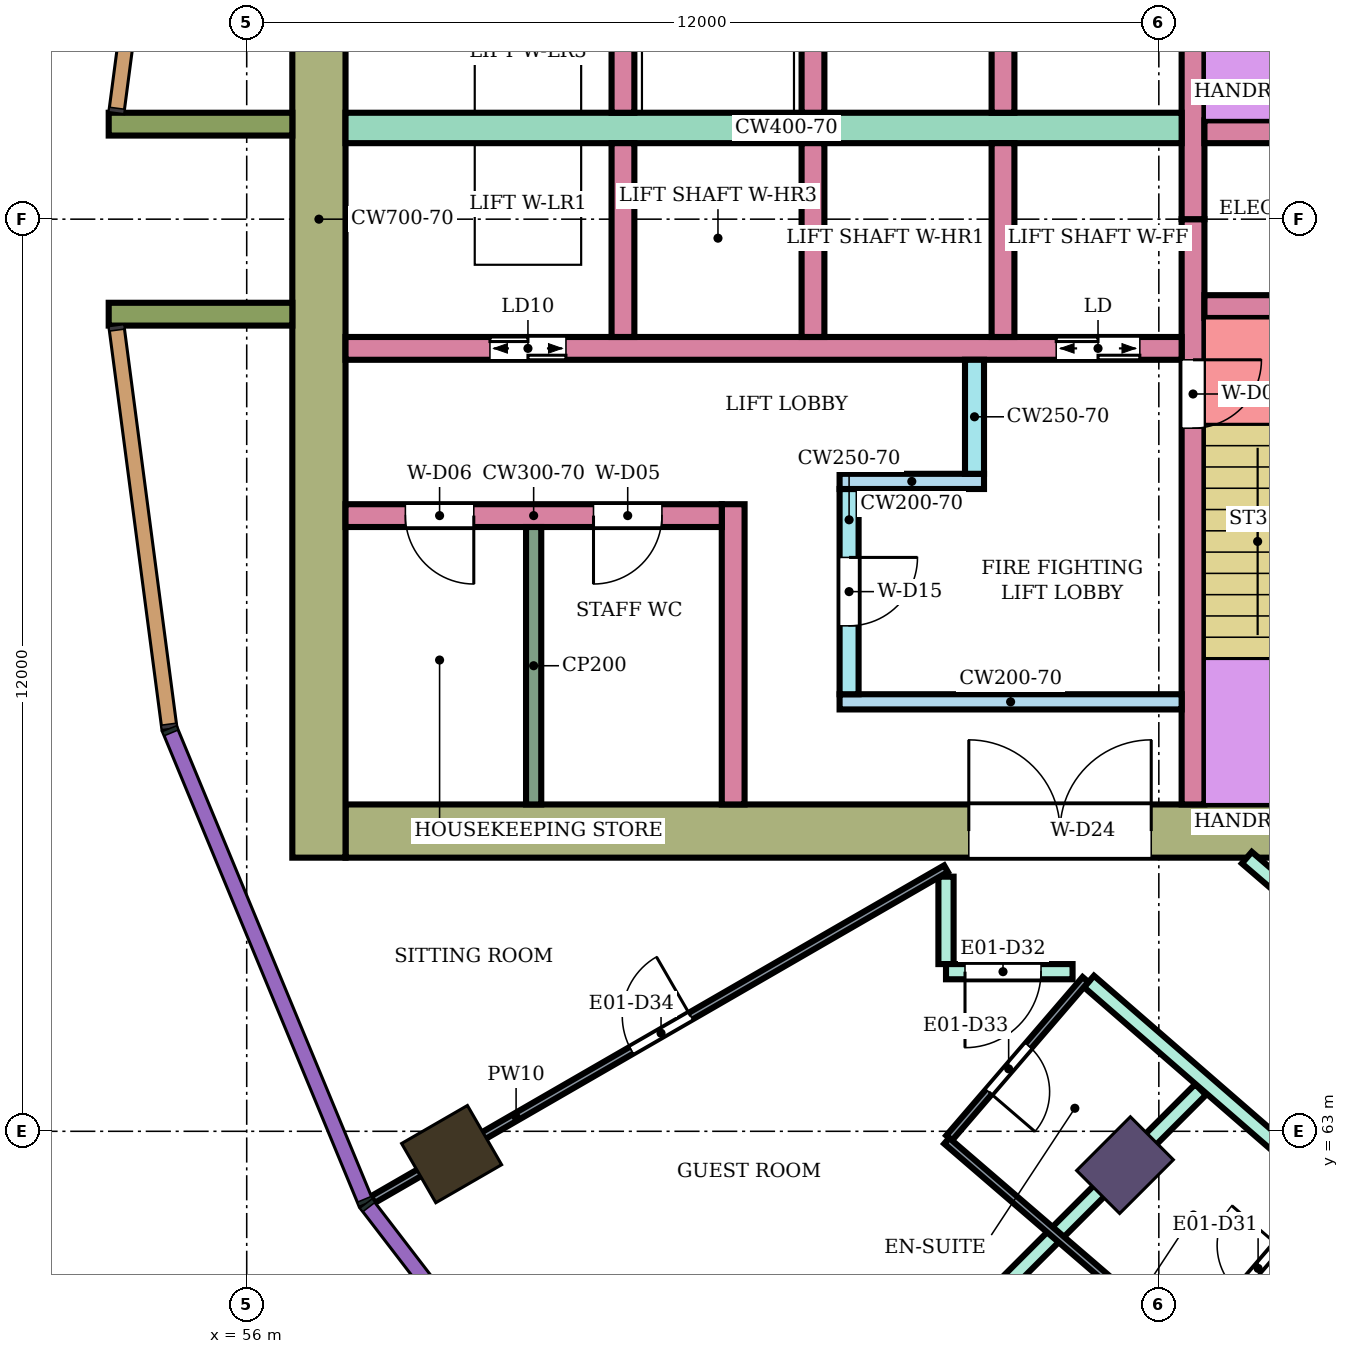
"""IFC4 building model, lengths in metres.
Left out: names, types, materials, properties, quantities, classifications, styles, units other than length and angle.
Written with IfcOpenShell. Run it as: python <this file> out.ifc"""

import sys

from ifc_helpers import new_model, si_unit, direction, frame, frame_2d, origin, origin_2d, place, context, subcontext, project, spatial, rectangle, extrude, element, fill, save


model = new_model("IFC4")
c1 = context("Model", 3, precision=1e-05, world=origin(), true_north=direction((0.0, 1.0)))
c2 = subcontext(c1, "Body", "Model", "MODEL_VIEW")
j1 = project(units=[si_unit("LENGTHUNIT", "METRE"), si_unit("PLANEANGLEUNIT", "RADIAN")], contexts=[c1])
p1 = place(None, origin())
s1 = spatial("IfcSite", under=j1, at=p1, CompositionType="ELEMENT")
p2 = place(p1, origin())
s2 = spatial("IfcBuilding", under=s1, at=p2, CompositionType="ELEMENT")
p3 = place(p2, frame((0.0, 0.0, 118.5)))
s3 = spatial("IfcBuildingStorey", under=s2, at=p3, CompositionType="ELEMENT", Elevation=118.5)
p4 = place(p3, frame((58.696, 62.7, 0.0), z_axis=(0.0, 0.0, 1.0), x_axis=(-0.866025403784, -0.5, 0.0)))
e1 = element("IfcColumn", 1, at=p4, inside=s3, PredefinedType="COLUMN", context=c2, shape_type="SweptSolid", body=[
    extrude(rectangle(XDim=1.0, YDim=0.9, at=origin_2d()), origin(), (0.0, 0.0, 1.0), 3.9),
])
p5 = place(p3, frame((67.555, 62.555, 0.0), z_axis=(0.0, 0.0, 1.0), x_axis=(-0.707106781187, -0.707106781187, 0.0)))
e2 = element("IfcColumn", 2, at=p5, inside=s3, PredefinedType="COLUMN", context=c2, shape_type="SweptSolid", body=[
    extrude(rectangle(XDim=1.0, YDim=0.8, at=origin_2d()), origin(), (0.0, 0.0, 1.0), 3.9),
])
p6 = place(p3, frame((72.1, 66.95, 0.0), z_axis=(0.0, 0.0, 1.0), x_axis=(-1.0, 0.0, 0.0)))
e3 = element("IfcWall", 3, at=p6, inside=s3, PredefinedType="SHEAR", context=c2, shape_type="SweptSolid", body=[
    extrude(rectangle(XDim=14.8, YDim=0.7, at=frame_2d((7.4, 0.0))), origin(), (0.0, 0.0, 1.0), 3.58),
])
p7 = place(p6, frame((4.2, 0.0, 0.0)))
e4 = element("IfcOpeningElement", 4, at=p7, cuts=e3, PredefinedType="OPENING", context=c2, shape_type="SweptSolid", body=[
    extrude(rectangle(XDim=2.4, YDim=2.4, at=frame_2d((1.2, 1.2))), frame((0.0, 0.36, 0.0), z_axis=(0.0, -1.0, 0.0), x_axis=(1.0, 0.0, 0.0)), (0.0, 0.0, 1.0), 0.72),
])
p8 = place(p3, frame((56.95, 83.4, 0.0), z_axis=(0.0, 0.0, 1.0), x_axis=(0.0, -1.0, 0.0)))
e5 = element("IfcWall", 5, at=p8, inside=s3, PredefinedType="SHEAR", context=c2, shape_type="SweptSolid", body=[
    extrude(rectangle(XDim=16.8, YDim=0.7, at=frame_2d((8.4, 0.0))), origin(), (0.0, 0.0, 1.0), 3.58),
])
p9 = place(p3, frame((68.45, 75.0, 0.0), z_axis=(0.0, 0.0, 1.0), x_axis=(0.0, -1.0, 0.0)))
e6 = element("IfcWall", 6, at=p9, inside=s3, PredefinedType="SHEAR", context=c2, shape_type="SweptSolid", body=[
    extrude(rectangle(XDim=7.7, YDim=0.3, at=frame_2d((3.85, 0.0))), origin(), (0.0, 0.0, 1.0), 3.58),
])
p10 = place(p9, frame((1.85, 0.0, 0.0)))
e7 = element("IfcOpeningElement", 7, at=p10, cuts=e6, PredefinedType="OPENING", context=c2, shape_type="SweptSolid", body=[
    extrude(rectangle(XDim=0.9, YDim=2.1, at=frame_2d((0.45, 1.05))), frame((0.0, 0.16, 0.0), z_axis=(0.0, -1.0, 0.0), x_axis=(1.0, 0.0, 0.0)), (0.0, 0.0, 1.0), 0.32),
])
p11 = place(p3, frame((68.45, 82.7, 0.0), z_axis=(0.0, 0.0, 1.0), x_axis=(0.0, -1.0, 0.0)))
e8 = element("IfcWall", 8, at=p11, inside=s3, PredefinedType="SHEAR", context=c2, shape_type="SweptSolid", body=[
    extrude(rectangle(XDim=7.7, YDim=0.3, at=frame_2d((3.85, 0.0))), origin(), (0.0, 0.0, 1.0), 3.58),
])
p12 = place(p11, frame((0.35, 0.0, 0.0)))
e9 = element("IfcOpeningElement", 9, at=p12, cuts=e8, PredefinedType="OPENING", context=c2, shape_type="SweptSolid", body=[
    extrude(rectangle(XDim=0.9, YDim=2.1, at=frame_2d((0.45, 1.05))), frame((0.0, 0.16, 0.0), z_axis=(0.0, -1.0, 0.0), x_axis=(1.0, 0.0, 0.0)), (0.0, 0.0, 1.0), 0.32),
])
p13 = place(p3, frame((71.65, 73.85, 0.0), z_axis=(0.0, 0.0, 1.0), x_axis=(-1.0, 0.0, 0.0)))
e10 = element("IfcWall", 10, at=p13, inside=s3, PredefinedType="SHEAR", context=c2, shape_type="SweptSolid", body=[
    extrude(rectangle(XDim=3.05, YDim=0.3, at=frame_2d((1.525, 0.0))), origin(), (0.0, 0.0, 1.0), 3.58),
])
p14 = place(p13, frame((1.1, 0.0, 0.0)))
e11 = element("IfcOpeningElement", 11, at=p14, cuts=e10, PredefinedType="OPENING", context=c2, shape_type="SweptSolid", body=[
    extrude(rectangle(XDim=0.7, YDim=2.0, at=frame_2d((0.35, 1.0))), frame((0.0, 0.16, 0.0), z_axis=(0.0, -1.0, 0.0), x_axis=(1.0, 0.0, 0.0)), (0.0, 0.0, 1.0), 0.32),
])
p15 = place(p3, frame((71.65, 76.15, 0.0), z_axis=(0.0, 0.0, 1.0), x_axis=(-1.0, 0.0, 0.0)))
e12 = element("IfcWall", 12, at=p15, inside=s3, PredefinedType="SHEAR", context=c2, shape_type="SweptSolid", body=[
    extrude(rectangle(XDim=3.05, YDim=0.3, at=frame_2d((1.525, 0.0))), origin(), (0.0, 0.0, 1.0), 3.58),
])
p16 = place(p3, frame((68.3, 73.3, 0.0), z_axis=(0.0, 0.0, 1.0), x_axis=(-1.0, 0.0, 0.0)))
e13 = element("IfcWall", 13, at=p16, inside=s3, PredefinedType="SHEAR", context=c2, shape_type="SweptSolid", body=[
    extrude(rectangle(XDim=11.0, YDim=0.3, at=frame_2d((5.5, 0.0))), origin(), (0.0, 0.0, 1.0), 3.58),
])
p17 = place(p16, frame((0.55, 0.0, 0.0)))
e14 = element("IfcOpeningElement", 14, at=p17, cuts=e13, PredefinedType="OPENING", context=c2, shape_type="SweptSolid", body=[
    extrude(rectangle(XDim=1.1, YDim=2.1, at=frame_2d((0.55, 1.05))), frame((0.0, 0.16, 0.0), z_axis=(0.0, -1.0, 0.0), x_axis=(1.0, 0.0, 0.0)), (0.0, 0.0, 1.0), 0.32),
])
p18 = place(p16, frame((8.1, 0.0, 0.0)))
e15 = element("IfcOpeningElement", 15, at=p18, cuts=e13, PredefinedType="OPENING", context=c2, shape_type="SweptSolid", body=[
    extrude(rectangle(XDim=1.0, YDim=2.1, at=frame_2d((0.5, 1.05))), frame((0.0, 0.16, 0.0), z_axis=(0.0, -1.0, 0.0), x_axis=(1.0, 0.0, 0.0)), (0.0, 0.0, 1.0), 0.32),
])
p19 = place(p3, frame((68.3, 76.2, 0.0), z_axis=(0.0, 0.0, 1.0), x_axis=(-1.0, 0.0, 0.0)))
e16 = element("IfcWall", 16, at=p19, inside=s3, PredefinedType="SHEAR", context=c2, shape_type="SweptSolid", body=[
    extrude(rectangle(XDim=11.0, YDim=0.4, at=frame_2d((5.5, 0.0))), origin(), (0.0, 0.0, 1.0), 3.58),
])
for number, where, z_axis, x_axis in (
    (17, (65.95, 76.0, 0.0), (0.0, 0.0, 1.0), (0.0, -1.0, 0.0)),
    (18, (63.45, 76.0, 0.0), (0.0, 0.0, 1.0), (0.0, -1.0, 0.0)),
    (19, (60.95, 76.0, 0.0), (0.0, 0.0, 1.0), (0.0, -1.0, 0.0)),
    (20, (65.95, 78.95, 0.0), (0.0, 0.0, 1.0), (0.0, -1.0, 0.0)),
    (21, (63.45, 78.95, 0.0), (0.0, 0.0, 1.0), (0.0, -1.0, 0.0)),
    (22, (60.95, 78.95, 0.0), (0.0, 0.0, 1.0), (0.0, -1.0, 0.0)),
):
    element("IfcWall", number, at=place(p3, frame(where, z_axis=z_axis, x_axis=x_axis)), inside=s3, PredefinedType="SHEAR", context=c2, shape_type="SweptSolid", body=[
        extrude(rectangle(XDim=2.55, YDim=0.3, at=frame_2d((1.275, 0.0))), origin(), (0.0, 0.0, 1.0), 3.58),
    ])
p20 = place(p3, frame((68.3, 68.65, 0.0), z_axis=(0.0, 0.0, 1.0), x_axis=(-1.0, 0.0, 0.0)))
e23 = element("IfcWall", 23, at=p20, inside=s3, PredefinedType="SHEAR", context=c2, shape_type="SweptSolid", body=[
    extrude(rectangle(XDim=4.5, YDim=0.2, at=frame_2d((2.25, 0.0))), origin(), (0.0, 0.0, 1.0), 3.58),
])
p21 = place(p3, frame((63.925, 71.45, 0.0), z_axis=(0.0, 0.0, 1.0), x_axis=(0.0, -1.0, 0.0)))
e24 = element("IfcWall", 24, at=p21, inside=s3, PredefinedType="SHEAR", context=c2, shape_type="SweptSolid", body=[
    extrude(rectangle(XDim=2.7, YDim=0.25, at=frame_2d((1.35, 0.0))), origin(), (0.0, 0.0, 1.0), 3.58),
])
p22 = place(p21, frame((0.9, 0.0, 0.0)))
e25 = element("IfcOpeningElement", 25, at=p22, cuts=e24, PredefinedType="OPENING", context=c2, shape_type="SweptSolid", body=[
    extrude(rectangle(XDim=0.9, YDim=2.1, at=frame_2d((0.45, 1.05))), frame((0.0, 0.135, 0.0), z_axis=(0.0, -1.0, 0.0), x_axis=(1.0, 0.0, 0.0)), (0.0, 0.0, 1.0), 0.27),
])
p23 = place(p3, frame((65.7, 71.55, 0.0), z_axis=(0.0, 0.0, 1.0), x_axis=(-1.0, 0.0, 0.0)))
e26 = element("IfcWall", 26, at=p23, inside=s3, PredefinedType="SHEAR", context=c2, shape_type="SweptSolid", body=[
    extrude(rectangle(XDim=1.9, YDim=0.2, at=frame_2d((0.95, 0.0))), origin(), (0.0, 0.0, 1.0), 3.58),
])
p24 = place(p3, frame((65.575, 73.15, 0.0), z_axis=(0.0, 0.0, 1.0), x_axis=(0.0, -1.0, 0.0)))
e27 = element("IfcWall", 27, at=p24, inside=s3, PredefinedType="SHEAR", context=c2, shape_type="SweptSolid", body=[
    extrude(rectangle(XDim=1.5, YDim=0.25, at=frame_2d((0.75, 0.0))), origin(), (0.0, 0.0, 1.0), 3.58),
])
p25 = place(p3, frame((62.4, 71.25, 0.0), z_axis=(0.0, 0.0, 1.0), x_axis=(0.0, -1.0, 0.0)))
e28 = element("IfcWall", 28, at=p25, inside=s3, PredefinedType="SHEAR", context=c2, shape_type="SweptSolid", body=[
    extrude(rectangle(XDim=3.95, YDim=0.3, at=frame_2d((1.975, 0.0))), origin(), (0.0, 0.0, 1.0), 3.58),
])
p26 = place(p3, frame((62.25, 71.1, 0.0), z_axis=(0.0, 0.0, 1.0), x_axis=(-1.0, 0.0, 0.0)))
e29 = element("IfcWall", 29, at=p26, inside=s3, PredefinedType="SHEAR", context=c2, shape_type="SweptSolid", body=[
    extrude(rectangle(XDim=4.95, YDim=0.3, at=frame_2d((2.475, 0.0))), origin(), (0.0, 0.0, 1.0), 3.58),
])
p27 = place(p26, frame((0.788, 0.0, 0.0)))
e30 = element("IfcOpeningElement", 30, at=p27, cuts=e29, PredefinedType="OPENING", context=c2, shape_type="SweptSolid", body=[
    extrude(rectangle(XDim=0.9, YDim=2.1, at=frame_2d((0.45, 1.05))), frame((0.0, 0.16, 0.0), z_axis=(0.0, -1.0, 0.0), x_axis=(1.0, 0.0, 0.0)), (0.0, 0.0, 1.0), 0.32),
])
p28 = place(p26, frame((3.262, 0.0, 0.0)))
e31 = element("IfcOpeningElement", 31, at=p28, cuts=e29, PredefinedType="OPENING", context=c2, shape_type="SweptSolid", body=[
    extrude(rectangle(XDim=0.9, YDim=2.1, at=frame_2d((0.45, 1.05))), frame((0.0, 0.16, 0.0), z_axis=(0.0, -1.0, 0.0), x_axis=(1.0, 0.0, 0.0)), (0.0, 0.0, 1.0), 0.32),
])
for number, where, z_axis, x_axis in (
    (32, (56.6, 76.25, 0.0), (0.0, 0.0, 1.0), (-1.0, 0.0, 0.0)),
    (33, (56.6, 73.75, 0.0), (0.0, 0.0, 1.0), (-1.0, 0.0, 0.0)),
):
    element("IfcWall", number, at=place(p3, frame(where, z_axis=z_axis, x_axis=x_axis)), inside=s3, PredefinedType="NOTDEFINED", context=c2, shape_type="SweptSolid", body=[
        extrude(rectangle(XDim=2.416, YDim=0.3, at=frame_2d((1.208, 0.0))), origin(), (0.0, 0.0, 1.0), 3.9),
    ])
p29 = place(p3, frame((63.596, 58.596, 0.0), z_axis=(0.0, 0.0, 1.0), x_axis=(0.707106781187, 0.707106781187, 0.0)))
e34 = element("IfcWall", 34, at=p29, inside=s3, PredefinedType="PARTITIONING", context=c2, shape_type="SweptSolid", body=[
    extrude(rectangle(XDim=7.005, YDim=0.2, at=frame_2d((3.503, 0.0))), origin(), (0.0, 0.0, 1.0), 3.45),
])
p30 = place(p3, frame((65.2, 65.2, 0.0), z_axis=(0.0, 0.0, 1.0), x_axis=(0.0, 1.0, 0.0)))
e35 = element("IfcWall", 35, at=p30, inside=s3, PredefinedType="PARTITIONING", context=c2, shape_type="SweptSolid", body=[
    extrude(rectangle(XDim=1.15, YDim=0.2, at=frame_2d((0.575, 0.0))), origin(), (0.0, 0.0, 1.0), 3.45),
])
p31 = place(p3, frame((65.2, 65.1, 0.0), z_axis=(0.0, 0.0, 1.0), x_axis=(1.0, 0.0, 0.0)))
e36 = element("IfcWall", 36, at=p31, inside=s3, PredefinedType="PARTITIONING", context=c2, shape_type="SweptSolid", body=[
    extrude(rectangle(XDim=1.665, YDim=0.2, at=frame_2d((0.833, 0.0))), origin(), (0.0, 0.0, 1.0), 3.45),
])
p32 = place(p31, frame((0.25, 0.0, 0.0)))
e37 = element("IfcOpeningElement", 37, at=p32, cuts=e36, PredefinedType="OPENING", context=c2, shape_type="SweptSolid", body=[
    extrude(rectangle(XDim=1.0, YDim=2.1, at=frame_2d((0.5, 1.05))), frame((0.0, 0.11, 0.0), z_axis=(0.0, -1.0, 0.0), x_axis=(1.0, 0.0, 0.0)), (0.0, 0.0, 1.0), 0.22),
])
p33 = place(p3, frame((67.081, 64.971, 0.0), z_axis=(0.0, 0.0, 1.0), x_axis=(0.755031061605, -0.65568902386, 0.0)))
e38 = element("IfcWall", 38, at=p33, inside=s3, PredefinedType="PARTITIONING", context=c2, shape_type="SweptSolid", body=[
    extrude(rectangle(XDim=6.186, YDim=0.2, at=frame_2d((3.093, 0.0))), origin(), (0.0, 0.0, 1.0), 3.45),
])
p34 = place(p33, frame((4.755, 0.0, 0.0)))
e39 = element("IfcOpeningElement", 39, at=p34, cuts=e38, PredefinedType="OPENING", context=c2, shape_type="SweptSolid", body=[
    extrude(rectangle(XDim=1.0, YDim=2.1, at=frame_2d((0.5, 1.05))), frame((0.0, 0.11, 0.0), z_axis=(0.0, -1.0, 0.0), x_axis=(1.0, 0.0, 0.0)), (0.0, 0.0, 1.0), 0.22),
])
p35 = place(p3, frame((69.158, 66.6, 0.0), z_axis=(0.0, 0.0, 1.0), x_axis=(0.758063092745, -0.652181222835, 0.0)))
e40 = element("IfcWall", 40, at=p35, inside=s3, PredefinedType="PARTITIONING", context=c2, shape_type="SweptSolid", body=[
    extrude(rectangle(XDim=5.16, YDim=0.2, at=frame_2d((2.58, 0.0))), origin(), (0.0, 0.0, 1.0), 3.45),
])
p36 = place(p35, frame((2.165, 0.0, 0.0)))
e41 = element("IfcOpeningElement", 41, at=p36, cuts=e40, PredefinedType="OPENING", context=c2, shape_type="SweptSolid", body=[
    extrude(rectangle(XDim=0.9, YDim=2.1, at=frame_2d((0.45, 1.05))), frame((0.0, 0.11, 0.0), z_axis=(0.0, -1.0, 0.0), x_axis=(1.0, 0.0, 0.0)), (0.0, 0.0, 1.0), 0.22),
])
p37 = place(p3, frame((57.659, 62.101, 0.0), z_axis=(0.0, 0.0, 1.0), x_axis=(0.86602264145, 0.500004784474, 0.0)))
e42 = element("IfcWall", 42, at=p37, inside=s3, PredefinedType="PARTITIONING", context=c2, shape_type="SweptSolid", body=[
    extrude(rectangle(XDim=8.708, YDim=0.1, at=frame_2d((4.354, 0.0))), origin(), (0.0, 0.0, 1.0), 3.45),
])
p38 = place(p37, frame((3.929, 0.0, 0.0)))
e43 = element("IfcOpeningElement", 43, at=p38, cuts=e42, PredefinedType="OPENING", context=c2, shape_type="SweptSolid", body=[
    extrude(rectangle(XDim=0.9, YDim=2.1, at=frame_2d((0.45, 1.05))), frame((0.0, 0.06, 0.0), z_axis=(0.0, -1.0, 0.0), x_axis=(1.0, 0.0, 0.0)), (0.0, 0.0, 1.0), 0.12),
])
p39 = place(p3, frame((65.242, 62.912, 0.0), z_axis=(0.0, 0.0, 1.0), x_axis=(0.652069888227, 0.758158862553, 0.0)))
e44 = element("IfcWall", 44, at=p39, inside=s3, PredefinedType="PARTITIONING", context=c2, shape_type="SweptSolid", body=[
    extrude(rectangle(XDim=2.75, YDim=0.1, at=frame_2d((1.375, 0.0))), origin(), (0.0, 0.0, 1.0), 3.45),
])
p40 = place(p39, frame((0.8, 0.0, 0.0)))
e45 = element("IfcOpeningElement", 45, at=p40, cuts=e44, PredefinedType="OPENING", context=c2, shape_type="SweptSolid", body=[
    extrude(rectangle(XDim=0.8, YDim=2.1, at=frame_2d((0.4, 1.05))), frame((0.0, 0.06, 0.0), z_axis=(0.0, -1.0, 0.0), x_axis=(1.0, 0.0, 0.0)), (0.0, 0.0, 1.0), 0.12),
])
p41 = place(p3, frame((65.209, 62.875, 0.0), z_axis=(0.0, 0.0, 1.0), x_axis=(0.757930378138, -0.652335451969, 0.0)))
e46 = element("IfcWall", 46, at=p41, inside=s3, PredefinedType="PARTITIONING", context=c2, shape_type="SweptSolid", body=[
    extrude(rectangle(XDim=4.15, YDim=0.1, at=frame_2d((2.075, 0.0))), origin(), (0.0, 0.0, 1.0), 3.45),
])
p42 = place(p3, frame((68.393, 60.135, 0.0), z_axis=(0.0, 0.0, 1.0), x_axis=(0.652061182569, 0.758166349944, 0.0)))
e47 = element("IfcWall", 47, at=p42, inside=s3, PredefinedType="PARTITIONING", context=c2, shape_type="SweptSolid", body=[
    extrude(rectangle(XDim=2.69, YDim=0.1, at=frame_2d((1.345, 0.0))), origin(), (0.0, 0.0, 1.0), 3.45),
])
p43 = place(p42, frame((1.0, 0.0, 0.0)))
e48 = element("IfcOpeningElement", 48, at=p43, cuts=e47, PredefinedType="OPENING", context=c2, shape_type="SweptSolid", body=[
    extrude(rectangle(XDim=0.8, YDim=2.1, at=frame_2d((0.4, 1.05))), frame((0.0, 0.06, 0.0), z_axis=(0.0, -1.0, 0.0), x_axis=(1.0, 0.0, 0.0)), (0.0, 0.0, 1.0), 0.12),
])
p44 = place(p3, frame((59.775, 70.95, 0.0), z_axis=(0.0, 0.0, 1.0), x_axis=(0.0, -1.0, 0.0)))
e49 = element("IfcWall", 49, at=p44, inside=s3, PredefinedType="PARTITIONING", context=c2, shape_type="SweptSolid", body=[
    extrude(rectangle(XDim=3.65, YDim=0.2, at=frame_2d((1.825, 0.0))), origin(), (0.0, 0.0, 1.0), 3.58),
])
p45 = place(p43, origin())
e50 = element("IfcDoor", 50, at=p45, inside=s3, OperationType="SINGLE_SWING_RIGHT", PredefinedType="DOOR", context=c2, shape_type="SweptSolid", body=[
    extrude(rectangle(XDim=0.8, YDim=2.1, at=frame_2d((0.4, 1.05))), frame((0.0, 0.025, 0.0), z_axis=(0.0, -1.0, 0.0), x_axis=(1.0, 0.0, 0.0)), (0.0, 0.0, 1.0), 0.05),
])
fill(e48, e50)
p46 = place(p32, frame((1.0, 0.0, 0.0), z_axis=(0.0, 0.0, 1.0), x_axis=(-1.0, 0.0, 0.0)))
e51 = element("IfcDoor", 51, at=p46, inside=s3, OperationType="SINGLE_SWING_RIGHT", PredefinedType="DOOR", context=c2, shape_type="SweptSolid", body=[
    extrude(rectangle(XDim=1.0, YDim=2.1, at=frame_2d((0.5, 1.05))), frame((0.0, 0.025, 0.0), z_axis=(0.0, -1.0, 0.0), x_axis=(1.0, 0.0, 0.0)), (0.0, 0.0, 1.0), 0.05),
])
fill(e37, e51)
p47 = place(p40, frame((0.8, 0.0, 0.0), z_axis=(0.0, 0.0, 1.0), x_axis=(-1.0, 0.0, 0.0)))
e52 = element("IfcDoor", 52, at=p47, inside=s3, OperationType="SINGLE_SWING_RIGHT", PredefinedType="DOOR", context=c2, shape_type="SweptSolid", body=[
    extrude(rectangle(XDim=0.8, YDim=2.1, at=frame_2d((0.4, 1.05))), frame((0.0, 0.025, 0.0), z_axis=(0.0, -1.0, 0.0), x_axis=(1.0, 0.0, 0.0)), (0.0, 0.0, 1.0), 0.05),
])
fill(e45, e52)
p48 = place(p38, origin())
e53 = element("IfcDoor", 53, at=p48, inside=s3, OperationType="SINGLE_SWING_RIGHT", PredefinedType="DOOR", context=c2, shape_type="SweptSolid", body=[
    extrude(rectangle(XDim=0.9, YDim=2.1, at=frame_2d((0.45, 1.05))), frame((0.0, 0.025, 0.0), z_axis=(0.0, -1.0, 0.0), x_axis=(1.0, 0.0, 0.0)), (0.0, 0.0, 1.0), 0.05),
])
fill(e43, e53)
p49 = place(p10, origin())
e54 = element("IfcDoor", 54, at=p49, inside=s3, OperationType="SINGLE_SWING_LEFT", PredefinedType="DOOR", context=c2, shape_type="SweptSolid", body=[
    extrude(rectangle(XDim=0.9, YDim=2.1, at=frame_2d((0.45, 1.05))), frame((0.0, 0.025, 0.0), z_axis=(0.0, -1.0, 0.0), x_axis=(1.0, 0.0, 0.0)), (0.0, 0.0, 1.0), 0.05),
])
fill(e7, e54)
p50 = place(p17, origin())
e55 = element("IfcDoor", 55, at=p50, inside=s3, OperationType="DOUBLE_DOOR_SLIDING", PredefinedType="DOOR", context=c2, shape_type="SweptSolid", body=[
    extrude(rectangle(XDim=1.1, YDim=2.1, at=frame_2d((0.55, 1.05))), frame((0.0, 0.025, 0.0), z_axis=(0.0, -1.0, 0.0), x_axis=(1.0, 0.0, 0.0)), (0.0, 0.0, 1.0), 0.05),
])
fill(e14, e55)
p51 = place(p18, origin())
e56 = element("IfcDoor", 56, at=p51, inside=s3, OperationType="DOUBLE_DOOR_SLIDING", PredefinedType="DOOR", context=c2, shape_type="SweptSolid", body=[
    extrude(rectangle(XDim=1.0, YDim=2.1, at=frame_2d((0.5, 1.05))), frame((0.0, 0.025, 0.0), z_axis=(0.0, -1.0, 0.0), x_axis=(1.0, 0.0, 0.0)), (0.0, 0.0, 1.0), 0.05),
])
fill(e15, e56)
p52 = place(p22, origin())
e57 = element("IfcDoor", 57, at=p52, inside=s3, OperationType="SINGLE_SWING_LEFT", PredefinedType="DOOR", context=c2, shape_type="SweptSolid", body=[
    extrude(rectangle(XDim=0.9, YDim=2.1, at=frame_2d((0.45, 1.05))), frame((0.0, 0.025, 0.0), z_axis=(0.0, -1.0, 0.0), x_axis=(1.0, 0.0, 0.0)), (0.0, 0.0, 1.0), 0.05),
])
fill(e25, e57)
p53 = place(p27, origin())
e58 = element("IfcDoor", 58, at=p53, inside=s3, OperationType="SINGLE_SWING_RIGHT", PredefinedType="DOOR", context=c2, shape_type="SweptSolid", body=[
    extrude(rectangle(XDim=0.9, YDim=2.1, at=frame_2d((0.45, 1.05))), frame((0.0, 0.025, 0.0), z_axis=(0.0, -1.0, 0.0), x_axis=(1.0, 0.0, 0.0)), (0.0, 0.0, 1.0), 0.05),
])
fill(e30, e58)
p54 = place(p28, origin())
e59 = element("IfcDoor", 59, at=p54, inside=s3, OperationType="SINGLE_SWING_LEFT", PredefinedType="DOOR", context=c2, shape_type="SweptSolid", body=[
    extrude(rectangle(XDim=0.9, YDim=2.1, at=frame_2d((0.45, 1.05))), frame((0.0, 0.025, 0.0), z_axis=(0.0, -1.0, 0.0), x_axis=(1.0, 0.0, 0.0)), (0.0, 0.0, 1.0), 0.05),
])
fill(e31, e59)
p55 = place(p7, frame((2.4, 0.0, 0.0), z_axis=(0.0, 0.0, 1.0), x_axis=(-1.0, 0.0, 0.0)))
e60 = element("IfcDoor", 60, at=p55, inside=s3, OperationType="DOUBLE_DOOR_SINGLE_SWING", PredefinedType="DOOR", context=c2, shape_type="SweptSolid", body=[
    extrude(rectangle(XDim=2.4, YDim=2.4, at=frame_2d((1.2, 1.2))), frame((0.0, 0.025, 0.0), z_axis=(0.0, -1.0, 0.0), x_axis=(1.0, 0.0, 0.0)), (0.0, 0.0, 1.0), 0.05),
])
fill(e4, e60)
save(model, sys.argv[1])
